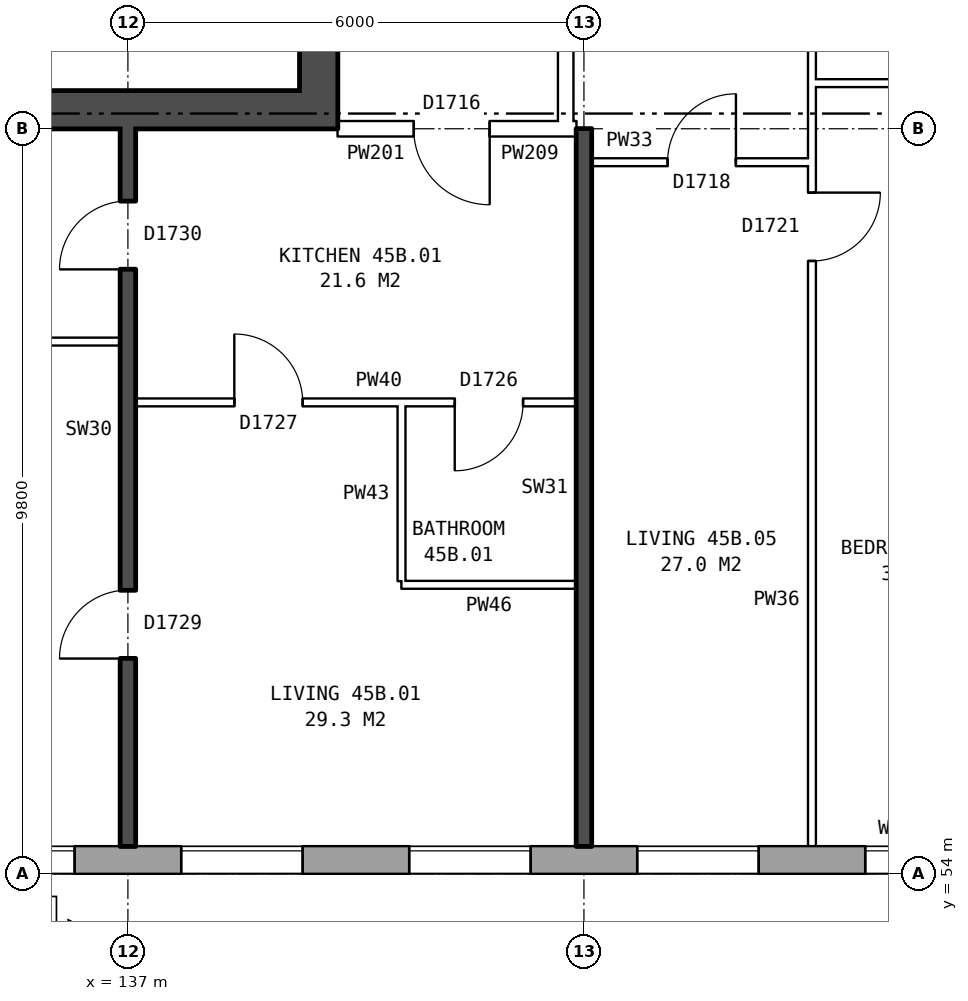
"""IFC4 building model, lengths in metres.
Left out: names, types, materials, properties, quantities, classifications, styles, units other than length and angle.
Written with IfcOpenShell. Run it as: python <this file> out.ifc"""

import sys

from ifc_helpers import new_model, si_unit, direction, frame, frame_2d, origin, place, context, subcontext, project, spatial, rectangle, extrude, element, fill, save


model = new_model("IFC4")
c1 = context("Model", 3, precision=1e-05, world=origin(), true_north=direction((0.0, 1.0)))
c2 = subcontext(c1, "Body", "Model", "MODEL_VIEW")
j1 = project(units=[si_unit("LENGTHUNIT", "METRE"), si_unit("PLANEANGLEUNIT", "RADIAN")], contexts=[c1])
p1 = place(None, origin())
s1 = spatial("IfcSite", under=j1, at=p1, CompositionType="ELEMENT")
p2 = place(p1, origin())
s2 = spatial("IfcBuilding", under=s1, at=p2, CompositionType="ELEMENT")
p3 = place(p2, frame((0.0, 0.0, 160.9)))
s3 = spatial("IfcBuildingStorey", under=s2, at=p3, CompositionType="ELEMENT", Elevation=160.9)
p4 = place(p3, frame((134.075, 54.18, 0.0), z_axis=(0.0, 0.0, 1.0), x_axis=(1.0, 0.0, 0.0)))
e1 = element("IfcWall", 1, at=p4, inside=s3, PredefinedType="STANDARD", context=c2, shape_type="SweptSolid", body=[
    extrude(rectangle(XDim=34.351, YDim=0.36, at=frame_2d((17.175, 0.0))), origin(), (0.0, 0.0, 1.0), 2.85),
])
p5 = place(p4, frame((0.625, 0.0, 0.8)))
e2 = element("IfcOpeningElement", 2, at=p5, cuts=e1, PredefinedType="OPENING", context=c2, shape_type="SweptSolid", body=[
    extrude(rectangle(XDim=1.6, YDim=1.8, at=frame_2d((0.8, 0.9))), frame((0.0, 0.19, 0.0), z_axis=(0.0, -1.0, 0.0), x_axis=(1.0, 0.0, 0.0)), (0.0, 0.0, 1.0), 0.38),
])
p6 = place(p4, frame((3.625, 0.0, 0.8)))
e3 = element("IfcOpeningElement", 3, at=p6, cuts=e1, PredefinedType="OPENING", context=c2, shape_type="SweptSolid", body=[
    extrude(rectangle(XDim=1.6, YDim=1.8, at=frame_2d((0.8, 0.9))), frame((0.0, 0.19, 0.0), z_axis=(0.0, -1.0, 0.0), x_axis=(1.0, 0.0, 0.0)), (0.0, 0.0, 1.0), 0.38),
])
p7 = place(p4, frame((6.625, 0.0, 0.8)))
e4 = element("IfcOpeningElement", 4, at=p7, cuts=e1, PredefinedType="OPENING", context=c2, shape_type="SweptSolid", body=[
    extrude(rectangle(XDim=1.6, YDim=1.8, at=frame_2d((0.8, 0.9))), frame((0.0, 0.19, 0.0), z_axis=(0.0, -1.0, 0.0), x_axis=(1.0, 0.0, 0.0)), (0.0, 0.0, 1.0), 0.38),
])
p8 = place(p4, frame((9.625, 0.0, 0.8)))
e5 = element("IfcOpeningElement", 5, at=p8, cuts=e1, PredefinedType="OPENING", context=c2, shape_type="SweptSolid", body=[
    extrude(rectangle(XDim=1.6, YDim=1.8, at=frame_2d((0.8, 0.9))), frame((0.0, 0.19, 0.0), z_axis=(0.0, -1.0, 0.0), x_axis=(1.0, 0.0, 0.0)), (0.0, 0.0, 1.0), 0.38),
])
p9 = place(p4, frame((12.625, 0.0, 0.15)))
e6 = element("IfcOpeningElement", 6, at=p9, cuts=e1, PredefinedType="OPENING", context=c2, shape_type="SweptSolid", body=[
    extrude(rectangle(XDim=0.8, YDim=0.9, at=frame_2d((0.4, 0.45))), frame((0.0, 0.19, 0.0), z_axis=(0.0, -1.0, 0.0), x_axis=(1.0, 0.0, 0.0)), (0.0, 0.0, 1.0), 0.38),
])
p10 = place(p4, frame((15.625, 0.0, 0.8)))
e7 = element("IfcOpeningElement", 7, at=p10, cuts=e1, PredefinedType="OPENING", context=c2, shape_type="SweptSolid", body=[
    extrude(rectangle(XDim=1.6, YDim=1.8, at=frame_2d((0.8, 0.9))), frame((0.0, 0.19, 0.0), z_axis=(0.0, -1.0, 0.0), x_axis=(1.0, 0.0, 0.0)), (0.0, 0.0, 1.0), 0.38),
])
p11 = place(p4, frame((18.625, 0.0, 0.8)))
e8 = element("IfcOpeningElement", 8, at=p11, cuts=e1, PredefinedType="OPENING", context=c2, shape_type="SweptSolid", body=[
    extrude(rectangle(XDim=1.6, YDim=1.8, at=frame_2d((0.8, 0.9))), frame((0.0, 0.19, 0.0), z_axis=(0.0, -1.0, 0.0), x_axis=(1.0, 0.0, 0.0)), (0.0, 0.0, 1.0), 0.38),
])
p12 = place(p4, frame((22.175, 0.0, 1.7)))
e9 = element("IfcOpeningElement", 9, at=p12, cuts=e1, PredefinedType="OPENING", context=c2, shape_type="SweptSolid", body=[
    extrude(rectangle(XDim=0.8, YDim=0.9, at=frame_2d((0.4, 0.45))), frame((0.0, 0.19, 0.0), z_axis=(0.0, -1.0, 0.0), x_axis=(1.0, 0.0, 0.0)), (0.0, 0.0, 1.0), 0.38),
])
p13 = place(p4, frame((24.625, 0.0, 0.8)))
e10 = element("IfcOpeningElement", 10, at=p13, cuts=e1, PredefinedType="OPENING", context=c2, shape_type="SweptSolid", body=[
    extrude(rectangle(XDim=1.6, YDim=1.8, at=frame_2d((0.8, 0.9))), frame((0.0, 0.19, 0.0), z_axis=(0.0, -1.0, 0.0), x_axis=(1.0, 0.0, 0.0)), (0.0, 0.0, 1.0), 0.38),
])
p14 = place(p4, frame((27.625, 0.0, 0.8)))
e11 = element("IfcOpeningElement", 11, at=p14, cuts=e1, PredefinedType="OPENING", context=c2, shape_type="SweptSolid", body=[
    extrude(rectangle(XDim=1.6, YDim=1.8, at=frame_2d((0.8, 0.9))), frame((0.0, 0.19, 0.0), z_axis=(0.0, -1.0, 0.0), x_axis=(1.0, 0.0, 0.0)), (0.0, 0.0, 1.0), 0.38),
])
p15 = place(p4, frame((30.625, 0.0, 0.8)))
e12 = element("IfcOpeningElement", 12, at=p15, cuts=e1, PredefinedType="OPENING", context=c2, shape_type="SweptSolid", body=[
    extrude(rectangle(XDim=1.6, YDim=1.8, at=frame_2d((0.8, 0.9))), frame((0.0, 0.19, 0.0), z_axis=(0.0, -1.0, 0.0), x_axis=(1.0, 0.0, 0.0)), (0.0, 0.0, 1.0), 0.38),
])
p16 = place(p4, frame((13.725, 0.0, 0.25)))
e13 = element("IfcOpeningElement", 13, at=p16, cuts=e1, PredefinedType="OPENING", context=c2, shape_type="SweptSolid", body=[
    extrude(rectangle(XDim=1.0, YDim=1.8, at=frame_2d((0.5, 0.9))), frame((0.0, 0.19, 0.0), z_axis=(0.0, -1.0, 0.0), x_axis=(1.0, 0.0, 0.0)), (0.0, 0.0, 1.0), 0.38),
])
p17 = place(p4, frame((23.275, 0.0, 0.8)))
e14 = element("IfcOpeningElement", 14, at=p17, cuts=e1, PredefinedType="OPENING", context=c2, shape_type="SweptSolid", body=[
    extrude(rectangle(XDim=1.0, YDim=1.8, at=frame_2d((0.5, 0.9))), frame((0.0, 0.19, 0.0), z_axis=(0.0, -1.0, 0.0), x_axis=(1.0, 0.0, 0.0)), (0.0, 0.0, 1.0), 0.38),
])
p18 = place(p3, frame((139.51, 63.8, 0.0), z_axis=(0.0, 0.0, 1.0), x_axis=(0.0, 1.0, 0.0)))
e15 = element("IfcWall", 15, at=p18, inside=s3, PredefinedType="SHEAR", context=c2, shape_type="SweptSolid", body=[
    extrude(rectangle(XDim=12.4, YDim=0.5, at=frame_2d((6.2, 0.0))), origin(), (0.0, 0.0, 1.0), 2.85),
])
p19 = place(p18, frame((1.325, 0.0, 0.0)))
e16 = element("IfcOpeningElement", 16, at=p19, cuts=e15, PredefinedType="OPENING", context=c2, shape_type="SweptSolid", body=[
    extrude(rectangle(XDim=1.1, YDim=2.1, at=frame_2d((0.55, 1.05))), frame((0.0, 0.26, 0.0), z_axis=(0.0, -1.0, 0.0), x_axis=(1.0, 0.0, 0.0)), (0.0, 0.0, 1.0), 0.52),
])
p20 = place(p18, frame((3.6, 0.0, 0.0)))
e17 = element("IfcOpeningElement", 17, at=p20, cuts=e15, PredefinedType="OPENING", context=c2, shape_type="SweptSolid", body=[
    extrude(rectangle(XDim=1.1, YDim=2.1, at=frame_2d((0.55, 1.05))), frame((0.0, 0.26, 0.0), z_axis=(0.0, -1.0, 0.0), x_axis=(1.0, 0.0, 0.0)), (0.0, 0.0, 1.0), 0.52),
])
p21 = place(p18, frame((5.8, 0.0, 0.0)))
e18 = element("IfcOpeningElement", 18, at=p21, cuts=e15, PredefinedType="OPENING", context=c2, shape_type="SweptSolid", body=[
    extrude(rectangle(XDim=1.1, YDim=2.1, at=frame_2d((0.55, 1.05))), frame((0.0, 0.26, 0.0), z_axis=(0.0, -1.0, 0.0), x_axis=(1.0, 0.0, 0.0)), (0.0, 0.0, 1.0), 0.52),
])
p22 = place(p18, frame((9.9, 0.0, 0.0)))
e19 = element("IfcOpeningElement", 19, at=p22, cuts=e15, PredefinedType="OPENING", context=c2, shape_type="SweptSolid", body=[
    extrude(rectangle(XDim=1.1, YDim=2.1, at=frame_2d((0.55, 1.05))), frame((0.0, 0.26, 0.0), z_axis=(0.0, -1.0, 0.0), x_axis=(1.0, 0.0, 0.0)), (0.0, 0.0, 1.0), 0.52),
])
p23 = place(p18, frame((8.125, 0.0, 0.0)))
e20 = element("IfcOpeningElement", 20, at=p23, cuts=e15, PredefinedType="OPENING", context=c2, shape_type="SweptSolid", body=[
    extrude(rectangle(XDim=0.85, YDim=2.1, at=frame_2d((0.425, 1.05))), frame((0.0, 0.26, 0.0), z_axis=(0.0, -1.0, 0.0), x_axis=(1.0, 0.0, 0.0)), (0.0, 0.0, 1.0), 0.52),
])
p24 = place(p3, frame((139.26, 64.05, 0.0), z_axis=(0.0, 0.0, 1.0), x_axis=(-1.0, 0.0, 0.0)))
e21 = element("IfcWall", 21, at=p24, inside=s3, PredefinedType="SHEAR", context=c2, shape_type="SweptSolid", body=[
    extrude(rectangle(XDim=7.4, YDim=0.5, at=frame_2d((3.7, 0.0))), origin(), (0.0, 0.0, 1.0), 2.85),
])
p25 = place(p3, frame((142.76, 63.9, 0.0), z_axis=(0.0, 0.0, 1.0), x_axis=(0.0, 1.0, 0.0)))
e22 = element("IfcWall", 22, at=p25, inside=s3, PredefinedType="PARTITIONING", context=c2, shape_type="SweptSolid", body=[
    extrude(rectangle(XDim=12.2, YDim=0.2, at=frame_2d((6.1, 0.0))), origin(), (0.0, 0.0, 1.0), 2.85),
])
p26 = place(p25, frame((5.1, 0.0, 0.0)))
e23 = element("IfcOpeningElement", 23, at=p26, cuts=e22, PredefinedType="OPENING", context=c2, shape_type="SweptSolid", body=[
    extrude(rectangle(XDim=2.0, YDim=2.1, at=frame_2d((1.0, 1.05))), frame((0.0, 0.11, 0.0), z_axis=(0.0, -1.0, 0.0), x_axis=(1.0, 0.0, 0.0)), (0.0, 0.0, 1.0), 0.22),
])
p27 = place(p3, frame((140.6, 57.8, 0.0), z_axis=(0.0, 0.0, 1.0), x_axis=(1.0, 0.0, 0.0)))
e24 = element("IfcWall", 24, at=p27, inside=s3, PredefinedType="PARTITIONING", context=c2, shape_type="SweptSolid", body=[
    extrude(rectangle(XDim=2.3, YDim=0.1, at=frame_2d((1.15, 0.0))), origin(), (0.0, 0.0, 1.0), 2.85),
])
p28 = place(p3, frame((137.1, 60.2, 0.0), z_axis=(0.0, 0.0, 1.0), x_axis=(1.0, 0.0, 0.0)))
e25 = element("IfcWall", 25, at=p28, inside=s3, PredefinedType="PARTITIONING", context=c2, shape_type="SweptSolid", body=[
    extrude(rectangle(XDim=5.8, YDim=0.1, at=frame_2d((2.9, 0.0))), origin(), (0.0, 0.0, 1.0), 2.85),
])
p29 = place(p28, frame((1.3, 0.0, 0.0)))
e26 = element("IfcOpeningElement", 26, at=p29, cuts=e25, PredefinedType="OPENING", context=c2, shape_type="SweptSolid", body=[
    extrude(rectangle(XDim=0.9, YDim=2.1, at=frame_2d((0.45, 1.05))), frame((0.0, 0.06, 0.0), z_axis=(0.0, -1.0, 0.0), x_axis=(1.0, 0.0, 0.0)), (0.0, 0.0, 1.0), 0.12),
])
p30 = place(p28, frame((4.2, 0.0, 0.0)))
e27 = element("IfcOpeningElement", 27, at=p30, cuts=e25, PredefinedType="OPENING", context=c2, shape_type="SweptSolid", body=[
    extrude(rectangle(XDim=0.9, YDim=2.1, at=frame_2d((0.45, 1.05))), frame((0.0, 0.06, 0.0), z_axis=(0.0, -1.0, 0.0), x_axis=(1.0, 0.0, 0.0)), (0.0, 0.0, 1.0), 0.12),
])
p31 = place(p3, frame((131.36, 61.0, 0.0), z_axis=(0.0, 0.0, 1.0), x_axis=(1.0, 0.0, 0.0)))
e28 = element("IfcWall", 28, at=p31, inside=s3, PredefinedType="PARTITIONING", context=c2, shape_type="SweptSolid", body=[
    extrude(rectangle(XDim=5.54, YDim=0.1, at=frame_2d((2.77, 0.0))), origin(), (0.0, 0.0, 1.0), 2.85),
])
p32 = place(p3, frame((143.1, 63.36, 0.0), z_axis=(0.0, 0.0, 1.0), x_axis=(1.0, 0.0, 0.0)))
e29 = element("IfcWall", 29, at=p32, inside=s3, PredefinedType="PARTITIONING", context=c2, shape_type="SweptSolid", body=[
    extrude(rectangle(XDim=2.9, YDim=0.1, at=frame_2d((1.45, 0.0))), origin(), (0.0, 0.0, 1.0), 2.85),
])
p33 = place(p32, frame((1.0, 0.0, 0.0)))
e30 = element("IfcOpeningElement", 30, at=p33, cuts=e29, PredefinedType="OPENING", context=c2, shape_type="SweptSolid", body=[
    extrude(rectangle(XDim=0.9, YDim=2.1, at=frame_2d((0.45, 1.05))), frame((0.0, 0.06, 0.0), z_axis=(0.0, -1.0, 0.0), x_axis=(1.0, 0.0, 0.0)), (0.0, 0.0, 1.0), 0.12),
])
p34 = place(p3, frame((139.76, 63.8, 0.0), z_axis=(0.0, 0.0, 1.0), x_axis=(1.0, 0.0, 0.0)))
e31 = element("IfcWall", 31, at=p34, inside=s3, PredefinedType="PARTITIONING", context=c2, shape_type="SweptSolid", body=[
    extrude(rectangle(XDim=3.0, YDim=0.2, at=frame_2d((1.5, 0.0))), origin(), (0.0, 0.0, 1.0), 2.85),
])
p35 = place(p34, frame((1.0, 0.0, 0.0)))
e32 = element("IfcOpeningElement", 32, at=p35, cuts=e31, PredefinedType="OPENING", context=c2, shape_type="SweptSolid", body=[
    extrude(rectangle(XDim=1.0, YDim=2.1, at=frame_2d((0.5, 1.05))), frame((0.0, 0.11, 0.0), z_axis=(0.0, -1.0, 0.0), x_axis=(1.0, 0.0, 0.0)), (0.0, 0.0, 1.0), 0.22),
])
p36 = place(p3, frame((142.76, 63.8, 0.0), z_axis=(0.0, 0.0, 1.0), x_axis=(1.0, 0.0, 0.0)))
e33 = element("IfcWall", 33, at=p36, inside=s3, PredefinedType="PARTITIONING", context=c2, shape_type="SweptSolid", body=[
    extrude(rectangle(XDim=0.14, YDim=0.2, at=frame_2d((0.07, 0.0))), origin(), (0.0, 0.0, 1.0), 2.85),
])
p37 = place(p3, frame((146.0, 64.4, 0.0), z_axis=(0.0, 0.0, 1.0), x_axis=(1.0, 0.0, 0.0)))
e34 = element("IfcWall", 34, at=p37, inside=s3, PredefinedType="PARTITIONING", context=c2, shape_type="SweptSolid", body=[
    extrude(rectangle(XDim=2.9, YDim=0.1, at=frame_2d((1.45, 0.0))), origin(), (0.0, 0.0, 1.0), 2.85),
])
p38 = place(p3, frame((137.0, 54.36, 0.0), z_axis=(0.0, 0.0, 1.0), x_axis=(0.0, 1.0, 0.0)))
e35 = element("IfcWall", 35, at=p38, inside=s3, PredefinedType="SOLIDWALL", context=c2, shape_type="SweptSolid", body=[
    extrude(rectangle(XDim=9.44, YDim=0.2, at=frame_2d((4.72, 0.0))), origin(), (0.0, 0.0, 1.0), 2.85),
])
p39 = place(p38, frame((2.47, 0.0, 0.0)))
e36 = element("IfcOpeningElement", 36, at=p39, cuts=e35, PredefinedType="OPENING", context=c2, shape_type="SweptSolid", body=[
    extrude(rectangle(XDim=0.9, YDim=2.1, at=frame_2d((0.45, 1.05))), frame((0.0, 0.11, 0.0), z_axis=(0.0, -1.0, 0.0), x_axis=(1.0, 0.0, 0.0)), (0.0, 0.0, 1.0), 0.22),
])
p40 = place(p38, frame((7.59, 0.0, 0.0)))
e37 = element("IfcOpeningElement", 37, at=p40, cuts=e35, PredefinedType="OPENING", context=c2, shape_type="SweptSolid", body=[
    extrude(rectangle(XDim=0.9, YDim=2.1, at=frame_2d((0.45, 1.05))), frame((0.0, 0.11, 0.0), z_axis=(0.0, -1.0, 0.0), x_axis=(1.0, 0.0, 0.0)), (0.0, 0.0, 1.0), 0.22),
])
p41 = place(p3, frame((140.6, 57.85, 0.0), z_axis=(0.0, 0.0, 1.0), x_axis=(0.0, 1.0, 0.0)))
e38 = element("IfcWall", 38, at=p41, inside=s3, PredefinedType="PARTITIONING", context=c2, shape_type="SweptSolid", body=[
    extrude(rectangle(XDim=2.3, YDim=0.1, at=frame_2d((1.15, 0.0))), origin(), (0.0, 0.0, 1.0), 2.85),
])
p42 = place(p3, frame((143.0, 54.36, 0.0), z_axis=(0.0, 0.0, 1.0), x_axis=(0.0, 1.0, 0.0)))
e39 = element("IfcWall", 39, at=p42, inside=s3, PredefinedType="SOLIDWALL", context=c2, shape_type="SweptSolid", body=[
    extrude(rectangle(XDim=9.44, YDim=0.2, at=frame_2d((4.72, 0.0))), origin(), (0.0, 0.0, 1.0), 2.85),
])
p43 = place(p3, frame((146.0, 54.36, 0.0), z_axis=(0.0, 0.0, 1.0), x_axis=(0.0, 1.0, 0.0)))
e40 = element("IfcWall", 40, at=p43, inside=s3, PredefinedType="PARTITIONING", context=c2, shape_type="SweptSolid", body=[
    extrude(rectangle(XDim=14.34, YDim=0.1, at=frame_2d((7.17, 0.0))), origin(), (0.0, 0.0, 1.0), 2.85),
])
p44 = place(p43, frame((7.7, 0.0, 0.0)))
e41 = element("IfcOpeningElement", 41, at=p44, cuts=e40, PredefinedType="OPENING", context=c2, shape_type="SweptSolid", body=[
    extrude(rectangle(XDim=0.9, YDim=2.1, at=frame_2d((0.45, 1.05))), frame((0.0, 0.06, 0.0), z_axis=(0.0, -1.0, 0.0), x_axis=(1.0, 0.0, 0.0)), (0.0, 0.0, 1.0), 0.12),
])
p45 = place(p43, frame((13.04, 0.0, 0.0)))
e42 = element("IfcOpeningElement", 42, at=p45, cuts=e40, PredefinedType="OPENING", context=c2, shape_type="SweptSolid", body=[
    extrude(rectangle(XDim=0.9, YDim=2.1, at=frame_2d((0.45, 1.05))), frame((0.0, 0.06, 0.0), z_axis=(0.0, -1.0, 0.0), x_axis=(1.0, 0.0, 0.0)), (0.0, 0.0, 1.0), 0.12),
])
p46 = place(p5, origin())
e43 = element("IfcWindow", 43, at=p46, inside=s3, PartitioningType="SINGLE_PANEL", PredefinedType="WINDOW", context=c2, shape_type="SweptSolid", body=[
    extrude(rectangle(XDim=1.6, YDim=1.8, at=frame_2d((0.8, 0.9))), frame((0.0, 0.15, 0.0), z_axis=(0.0, -1.0, 0.0), x_axis=(1.0, 0.0, 0.0)), (0.0, 0.0, 1.0), 0.06),
])
fill(e2, e43)
p47 = place(p6, origin())
e44 = element("IfcWindow", 44, at=p47, inside=s3, PartitioningType="SINGLE_PANEL", PredefinedType="WINDOW", context=c2, shape_type="SweptSolid", body=[
    extrude(rectangle(XDim=1.6, YDim=1.8, at=frame_2d((0.8, 0.9))), frame((0.0, 0.15, 0.0), z_axis=(0.0, -1.0, 0.0), x_axis=(1.0, 0.0, 0.0)), (0.0, 0.0, 1.0), 0.06),
])
fill(e3, e44)
p48 = place(p7, origin())
e45 = element("IfcWindow", 45, at=p48, inside=s3, PartitioningType="SINGLE_PANEL", PredefinedType="WINDOW", context=c2, shape_type="SweptSolid", body=[
    extrude(rectangle(XDim=1.6, YDim=1.8, at=frame_2d((0.8, 0.9))), frame((0.0, 0.15, 0.0), z_axis=(0.0, -1.0, 0.0), x_axis=(1.0, 0.0, 0.0)), (0.0, 0.0, 1.0), 0.06),
])
fill(e4, e45)
p49 = place(p8, origin())
e46 = element("IfcWindow", 46, at=p49, inside=s3, PartitioningType="SINGLE_PANEL", PredefinedType="WINDOW", context=c2, shape_type="SweptSolid", body=[
    extrude(rectangle(XDim=1.6, YDim=1.8, at=frame_2d((0.8, 0.9))), frame((0.0, 0.15, 0.0), z_axis=(0.0, -1.0, 0.0), x_axis=(1.0, 0.0, 0.0)), (0.0, 0.0, 1.0), 0.06),
])
fill(e5, e46)
p50 = place(p9, origin())
e47 = element("IfcWindow", 47, at=p50, inside=s3, PartitioningType="SINGLE_PANEL", PredefinedType="WINDOW", context=c2, shape_type="SweptSolid", body=[
    extrude(rectangle(XDim=0.8, YDim=0.9, at=frame_2d((0.4, 0.45))), frame((0.0, 0.15, 0.0), z_axis=(0.0, -1.0, 0.0), x_axis=(1.0, 0.0, 0.0)), (0.0, 0.0, 1.0), 0.06),
])
fill(e6, e47)
p51 = place(p39, origin())
e48 = element("IfcDoor", 48, at=p51, inside=s3, OperationType="SINGLE_SWING_LEFT", PredefinedType="DOOR", context=c2, shape_type="SweptSolid", body=[
    extrude(rectangle(XDim=0.9, YDim=2.1, at=frame_2d((0.45, 1.05))), frame((0.0, 0.025, 0.0), z_axis=(0.0, -1.0, 0.0), x_axis=(1.0, 0.0, 0.0)), (0.0, 0.0, 1.0), 0.05),
])
fill(e36, e48)
p52 = place(p40, origin())
e49 = element("IfcDoor", 49, at=p52, inside=s3, OperationType="SINGLE_SWING_LEFT", PredefinedType="DOOR", context=c2, shape_type="SweptSolid", body=[
    extrude(rectangle(XDim=0.9, YDim=2.1, at=frame_2d((0.45, 1.05))), frame((0.0, 0.025, 0.0), z_axis=(0.0, -1.0, 0.0), x_axis=(1.0, 0.0, 0.0)), (0.0, 0.0, 1.0), 0.05),
])
fill(e37, e49)
p53 = place(p35, frame((1.0, 0.0, 0.0), z_axis=(0.0, 0.0, 1.0), x_axis=(-1.0, 0.0, 0.0)))
e50 = element("IfcDoor", 50, at=p53, inside=s3, OperationType="SINGLE_SWING_LEFT", PredefinedType="DOOR", context=c2, shape_type="SweptSolid", body=[
    extrude(rectangle(XDim=1.0, YDim=2.1, at=frame_2d((0.5, 1.05))), frame((0.0, 0.025, 0.0), z_axis=(0.0, -1.0, 0.0), x_axis=(1.0, 0.0, 0.0)), (0.0, 0.0, 1.0), 0.05),
])
fill(e32, e50)
p54 = place(p29, origin())
e51 = element("IfcDoor", 51, at=p54, inside=s3, OperationType="SINGLE_SWING_LEFT", PredefinedType="DOOR", context=c2, shape_type="SweptSolid", body=[
    extrude(rectangle(XDim=0.9, YDim=2.1, at=frame_2d((0.45, 1.05))), frame((0.0, 0.025, 0.0), z_axis=(0.0, -1.0, 0.0), x_axis=(1.0, 0.0, 0.0)), (0.0, 0.0, 1.0), 0.05),
])
fill(e26, e51)
p55 = place(p30, frame((0.9, 0.0, 0.0), z_axis=(0.0, 0.0, 1.0), x_axis=(-1.0, 0.0, 0.0)))
e52 = element("IfcDoor", 52, at=p55, inside=s3, OperationType="SINGLE_SWING_RIGHT", PredefinedType="DOOR", context=c2, shape_type="SweptSolid", body=[
    extrude(rectangle(XDim=0.9, YDim=2.1, at=frame_2d((0.45, 1.05))), frame((0.0, 0.025, 0.0), z_axis=(0.0, -1.0, 0.0), x_axis=(1.0, 0.0, 0.0)), (0.0, 0.0, 1.0), 0.05),
])
fill(e27, e52)
p56 = place(p44, frame((0.9, 0.0, 0.0), z_axis=(0.0, 0.0, 1.0), x_axis=(-1.0, 0.0, 0.0)))
e53 = element("IfcDoor", 53, at=p56, inside=s3, OperationType="SINGLE_SWING_LEFT", PredefinedType="DOOR", context=c2, shape_type="SweptSolid", body=[
    extrude(rectangle(XDim=0.9, YDim=2.1, at=frame_2d((0.45, 1.05))), frame((0.0, 0.025, 0.0), z_axis=(0.0, -1.0, 0.0), x_axis=(1.0, 0.0, 0.0)), (0.0, 0.0, 1.0), 0.05),
])
fill(e41, e53)
p57 = place(p33, origin())
e54 = element("IfcDoor", 54, at=p57, inside=s3, OperationType="SINGLE_SWING_RIGHT", PredefinedType="DOOR", context=c2, shape_type="SweptSolid", body=[
    extrude(rectangle(XDim=0.9, YDim=2.1, at=frame_2d((0.45, 1.05))), frame((0.0, 0.025, 0.0), z_axis=(0.0, -1.0, 0.0), x_axis=(1.0, 0.0, 0.0)), (0.0, 0.0, 1.0), 0.05),
])
fill(e30, e54)
save(model, sys.argv[1])
